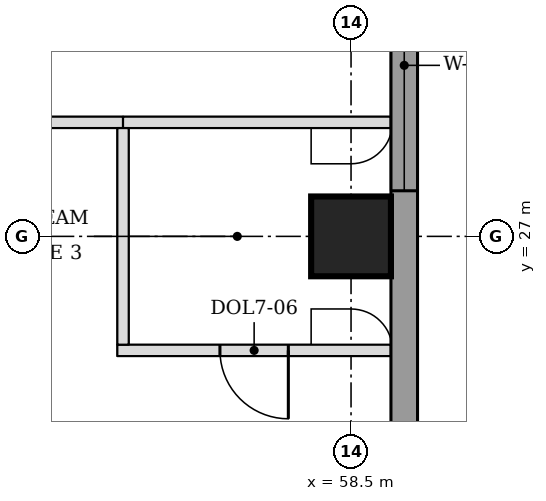
"""IFC4 building model, lengths in metres.
Left out: names, types, materials, properties, quantities, classifications, styles, units other than length and angle.
Written with IfcOpenShell. Run it as: python <this file> out.ifc"""

import sys

from ifc_helpers import new_model, si_unit, direction, frame, frame_2d, origin, origin_2d, place, context, subcontext, project, spatial, rectangle, extrude, element, fill, save


model = new_model("IFC4")
c1 = context("Model", 3, precision=1e-05, world=origin(), true_north=direction((0.0, 1.0)))
c2 = subcontext(c1, "Body", "Model", "MODEL_VIEW")
j1 = project(units=[si_unit("LENGTHUNIT", "METRE"), si_unit("PLANEANGLEUNIT", "RADIAN")], contexts=[c1])
p1 = place(None, origin())
s1 = spatial("IfcSite", under=j1, at=p1, CompositionType="ELEMENT")
p2 = place(p1, origin())
s2 = spatial("IfcBuilding", under=s1, at=p2, CompositionType="ELEMENT")
p3 = place(p2, frame((0.0, 0.0, 134.4)))
s3 = spatial("IfcBuildingStorey", under=s2, at=p3, CompositionType="ELEMENT", Elevation=134.4)
p4 = place(p3, frame((58.5, 27.0, 0.0), z_axis=(0.0, 0.0, 1.0), x_axis=(1.0, 0.0, 0.0)))
e1 = element("IfcColumn", 1, at=p4, inside=s3, PredefinedType="COLUMN", context=c2, shape_type="SweptSolid", body=[
    extrude(rectangle(XDim=1.05, YDim=1.05, at=origin_2d()), origin(), (0.0, 0.0, 1.0), 3.7),
])
p5 = place(p3, frame((59.2, 22.138, 0.0), z_axis=(0.0, 0.0, 1.0), x_axis=(0.0, 1.0, 0.0)))
e2 = element("IfcWall", 2, at=p5, inside=s3, PredefinedType="STANDARD", context=c2, shape_type="SweptSolid", body=[
    extrude(rectangle(XDim=17.837, YDim=0.35, at=frame_2d((8.919, 0.0))), origin(), (0.0, 0.0, 1.0), 3.525),
])
p6 = place(p5, frame((5.462, 0.0, 0.9)))
e3 = element("IfcOpeningElement", 3, at=p6, cuts=e2, PredefinedType="OPENING", context=c2, shape_type="SweptSolid", body=[
    extrude(rectangle(XDim=3.3, YDim=1.9, at=frame_2d((1.65, 0.95))), frame((0.0, 0.185, 0.0), z_axis=(0.0, -1.0, 0.0), x_axis=(1.0, 0.0, 0.0)), (0.0, 0.0, 1.0), 0.37),
])
p7 = place(p5, frame((14.037, 0.0, 0.9)))
e4 = element("IfcOpeningElement", 4, at=p7, cuts=e2, PredefinedType="OPENING", context=c2, shape_type="SweptSolid", body=[
    extrude(rectangle(XDim=3.3, YDim=1.9, at=frame_2d((1.65, 0.95))), frame((0.0, 0.185, 0.0), z_axis=(0.0, -1.0, 0.0), x_axis=(1.0, 0.0, 0.0)), (0.0, 0.0, 1.0), 0.37),
])
p8 = place(p3, frame((55.425, 25.5, 0.0), z_axis=(0.0, 0.0, 1.0), x_axis=(1.0, 0.0, 0.0)))
e5 = element("IfcWall", 5, at=p8, inside=s3, PredefinedType="PARTITIONING", context=c2, shape_type="SweptSolid", body=[
    extrude(rectangle(XDim=3.6, YDim=0.15, at=frame_2d((1.8, 0.0))), origin(), (0.0, 0.0, 1.0), 3.55),
])
p9 = place(p8, frame((1.35, 0.0, 0.0)))
e6 = element("IfcOpeningElement", 6, at=p9, cuts=e5, PredefinedType="OPENING", context=c2, shape_type="SweptSolid", body=[
    extrude(rectangle(XDim=0.9, YDim=2.1, at=frame_2d((0.45, 1.05))), frame((0.0, 0.085, 0.0), z_axis=(0.0, -1.0, 0.0), x_axis=(1.0, 0.0, 0.0)), (0.0, 0.0, 1.0), 0.17),
])
p10 = place(p3, frame((49.5, 28.5, 0.0), z_axis=(0.0, 0.0, 1.0), x_axis=(1.0, 0.0, 0.0)))
e7 = element("IfcWall", 7, at=p10, inside=s3, PredefinedType="PARTITIONING", context=c2, shape_type="SweptSolid", body=[
    extrude(rectangle(XDim=6.0, YDim=0.15, at=frame_2d((3.0, 0.0))), origin(), (0.0, 0.0, 1.0), 3.55),
])
p11 = place(p3, frame((55.5, 28.5, 0.0), z_axis=(0.0, 0.0, 1.0), x_axis=(1.0, 0.0, 0.0)))
e8 = element("IfcWall", 8, at=p11, inside=s3, PredefinedType="PARTITIONING", context=c2, shape_type="SweptSolid", body=[
    extrude(rectangle(XDim=3.525, YDim=0.15, at=frame_2d((1.762, 0.0))), origin(), (0.0, 0.0, 1.0), 3.55),
])
p12 = place(p3, frame((55.5, 25.575, 0.0), z_axis=(0.0, 0.0, 1.0), x_axis=(0.0, 1.0, 0.0)))
e9 = element("IfcWall", 9, at=p12, inside=s3, PredefinedType="PARTITIONING", context=c2, shape_type="SweptSolid", body=[
    extrude(rectangle(XDim=2.85, YDim=0.15, at=frame_2d((1.425, 0.0))), origin(), (0.0, 0.0, 1.0), 3.55),
])
p13 = place(p6, origin())
e10 = element("IfcWindow", 10, at=p13, inside=s3, PartitioningType="SINGLE_PANEL", PredefinedType="WINDOW", context=c2, shape_type="SweptSolid", body=[
    extrude(rectangle(XDim=3.3, YDim=1.9, at=frame_2d((1.65, 0.95))), frame((0.0, 0.085, 0.0), z_axis=(0.0, -1.0, 0.0), x_axis=(1.0, 0.0, 0.0)), (0.0, 0.0, 1.0), 0.06),
])
fill(e3, e10)
p14 = place(p9, frame((0.9, 0.0, 0.0), z_axis=(0.0, 0.0, 1.0), x_axis=(-1.0, 0.0, 0.0)))
e11 = element("IfcDoor", 11, at=p14, inside=s3, OperationType="SINGLE_SWING_LEFT", PredefinedType="DOOR", context=c2, shape_type="SweptSolid", body=[
    extrude(rectangle(XDim=0.9, YDim=2.1, at=frame_2d((0.45, 1.05))), frame((0.0, 0.025, 0.0), z_axis=(0.0, -1.0, 0.0), x_axis=(1.0, 0.0, 0.0)), (0.0, 0.0, 1.0), 0.05),
])
fill(e6, e11)
save(model, sys.argv[1])
